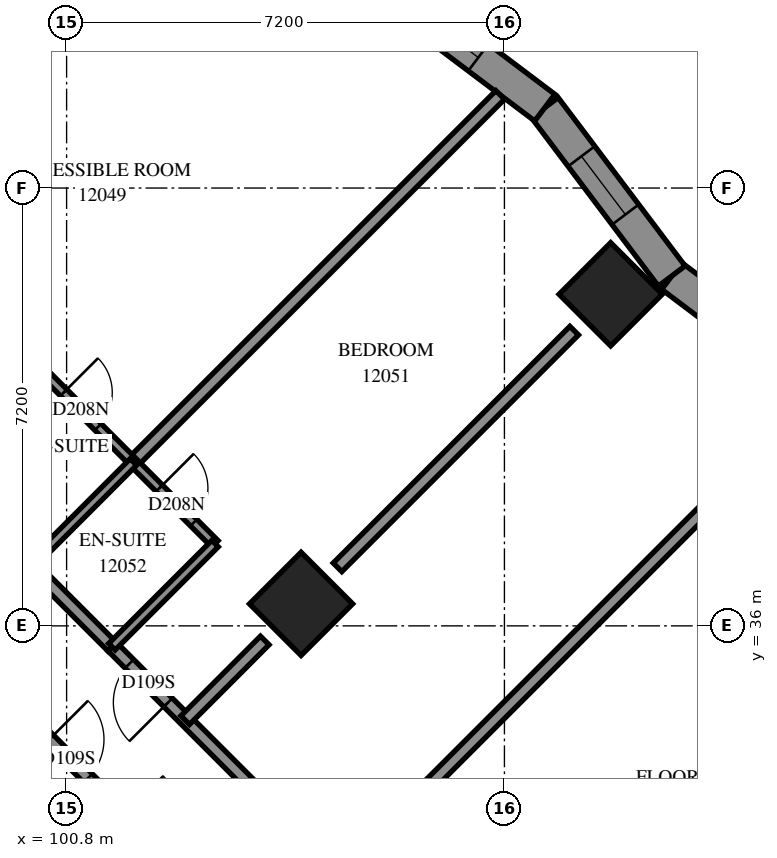
"""IFC4 building model, lengths in metres.
Left out: names, types, materials, properties, quantities, classifications, styles, units other than length and angle.
Written with IfcOpenShell. Run it as: python <this file> out.ifc"""

import sys

from ifc_helpers import new_model, si_unit, direction, frame, frame_2d, origin, origin_2d, place, context, subcontext, project, spatial, polyline, rectangle, outline, extrude, element, fill, save


model = new_model("IFC4")
c1 = context("Model", 3, precision=1e-05, world=origin(), true_north=direction((0.0, 1.0)))
c2 = subcontext(c1, "Body", "Model", "MODEL_VIEW")
j1 = project(units=[si_unit("LENGTHUNIT", "METRE"), si_unit("PLANEANGLEUNIT", "RADIAN")], contexts=[c1])
p1 = place(None, origin())
s1 = spatial("IfcSite", under=j1, at=p1, CompositionType="ELEMENT")
p2 = place(p1, origin())
s2 = spatial("IfcBuilding", under=s1, at=p2, CompositionType="ELEMENT")
p3 = place(p2, frame((0.0, 0.0, 47.4)))
s3 = spatial("IfcBuildingStorey", under=s2, at=p3, CompositionType="ELEMENT", Elevation=47.4)
for number, where, z_axis, x_axis in (
    (1, (109.747, 41.453, 0.0), (0.0, 0.0, 1.0), (0.707, -0.707, 0.0)),
    (2, (104.656, 36.362, 0.0), (0.0, 0.0, 1.0), (0.707, -0.707, 0.0)),
):
    element("IfcColumn", number, at=place(p3, frame(where, z_axis=z_axis, x_axis=x_axis)), inside=s3, PredefinedType="COLUMN", context=c2, shape_type="SweptSolid", body=[
        extrude(rectangle(XDim=1.2, YDim=1.2, at=origin_2d()), origin(), (0.0, 0.0, 1.0), 3.1),
    ])
p4 = place(p3, frame((113.52, 39.666, 0.0), z_axis=(0.0, 0.0, 1.0), x_axis=(-0.7985233882, 0.601963785, 0.0)))
e3 = element("IfcWall", 3, at=p4, inside=s3, PredefinedType="SOLIDWALL", context=c2, shape_type="SweptSolid", body=[
    extrude(outline(polyline([(-0.039, -0.275), (3.429, -0.275), (3.506, 0.275), (0.039, 0.275), (-0.039, -0.275)])), origin(), (0.0, 0.0, 1.0), 3.1),
])
p5 = place(p4, frame((1.153, 0.0, 0.5)))
e4 = element("IfcOpeningElement", 4, at=p5, cuts=e3, PredefinedType="OPENING", context=c2, shape_type="SweptSolid", body=[
    extrude(rectangle(XDim=1.2, YDim=2.45, at=frame_2d((0.6, 1.225))), frame((0.0, 0.285, 0.0), z_axis=(0.0, -1.0, 0.0), x_axis=(1.0, 0.0, 0.0)), (0.0, 0.0, 1.0), 0.57),
])
p6 = place(p3, frame((110.751, 41.753, 0.0), z_axis=(0.0, 0.0, 1.0), x_axis=(-0.6019683111, 0.7985199762, 0.0)))
e5 = element("IfcWall", 5, at=p6, inside=s3, PredefinedType="SOLIDWALL", context=c2, shape_type="SweptSolid", body=[
    extrude(outline(polyline([(0.039, -0.275), (3.506, -0.275), (3.429, 0.275), (-0.039, 0.275), (0.039, -0.275)])), origin(), (0.0, 0.0, 1.0), 3.1),
])
p7 = place(p6, frame((1.266, 0.0, 0.5)))
e6 = element("IfcOpeningElement", 6, at=p7, cuts=e5, PredefinedType="OPENING", context=c2, shape_type="SweptSolid", body=[
    extrude(rectangle(XDim=1.2, YDim=2.45, at=frame_2d((0.6, 1.225))), frame((0.0, 0.285, 0.0), z_axis=(0.0, -1.0, 0.0), x_axis=(1.0, 0.0, 0.0)), (0.0, 0.0, 1.0), 0.57),
])
p8 = place(p3, frame((108.664, 44.522, 0.0), z_axis=(0.0, 0.0, 1.0), x_axis=(-0.7985338376, 0.6019499233, 0.0)))
e7 = element("IfcWall", 7, at=p8, inside=s3, PredefinedType="SOLIDWALL", context=c2, shape_type="SweptSolid", body=[
    extrude(outline(polyline([(-0.039, -0.275), (3.429, -0.275), (3.506, 0.275), (0.039, 0.275), (-0.039, -0.275)])), origin(), (0.0, 0.0, 1.0), 3.1),
])
p9 = place(p8, frame((1.369, 0.0, 0.5)))
e8 = element("IfcOpeningElement", 8, at=p9, cuts=e7, PredefinedType="OPENING", context=c2, shape_type="SweptSolid", body=[
    extrude(rectangle(XDim=1.2, YDim=2.45, at=frame_2d((0.6, 1.225))), frame((0.0, 0.285, 0.0), z_axis=(0.0, -1.0, 0.0), x_axis=(1.0, 0.0, 0.0)), (0.0, 0.0, 1.0), 0.57),
])
p10 = place(p3, frame((93.481, 41.167, 0.0), z_axis=(0.0, 0.0, 1.0), x_axis=(0.7071067812, -0.7071067812, 0.0)))
e9 = element("IfcWall", 9, at=p10, inside=s3, PredefinedType="PARTITIONING", context=c2, shape_type="SweptSolid", body=[
    extrude(rectangle(XDim=25.699, YDim=0.2, at=frame_2d((12.85, 0.0))), origin(), (0.0, 0.0, 1.0), 3.1),
])
p11 = place(p10, frame((2.8, 0.0, 0.0)))
e10 = element("IfcOpeningElement", 10, at=p11, cuts=e9, PredefinedType="OPENING", context=c2, shape_type="SweptSolid", body=[
    extrude(rectangle(XDim=0.9, YDim=2.1, at=frame_2d((0.45, 1.05))), frame((0.0, 0.11, 0.0), z_axis=(0.0, -1.0, 0.0), x_axis=(1.0, 0.0, 0.0)), (0.0, 0.0, 1.0), 0.22),
])
p12 = place(p10, frame((9.948, 0.0, 0.0)))
e11 = element("IfcOpeningElement", 11, at=p12, cuts=e9, PredefinedType="OPENING", context=c2, shape_type="SweptSolid", body=[
    extrude(rectangle(XDim=0.9, YDim=2.1, at=frame_2d((0.45, 1.05))), frame((0.0, 0.11, 0.0), z_axis=(0.0, -1.0, 0.0), x_axis=(1.0, 0.0, 0.0)), (0.0, 0.0, 1.0), 0.22),
])
p13 = place(p10, frame((11.7, 0.0, 0.0)))
e12 = element("IfcOpeningElement", 12, at=p13, cuts=e9, PredefinedType="OPENING", context=c2, shape_type="SweptSolid", body=[
    extrude(rectangle(XDim=0.9, YDim=2.1, at=frame_2d((0.45, 1.05))), frame((0.0, 0.11, 0.0), z_axis=(0.0, -1.0, 0.0), x_axis=(1.0, 0.0, 0.0)), (0.0, 0.0, 1.0), 0.22),
])
p14 = place(p10, frame((17.25, 0.0, 0.0)))
e13 = element("IfcOpeningElement", 13, at=p14, cuts=e9, PredefinedType="OPENING", context=c2, shape_type="SweptSolid", body=[
    extrude(rectangle(XDim=0.9, YDim=2.1, at=frame_2d((0.45, 1.05))), frame((0.0, 0.11, 0.0), z_axis=(0.0, -1.0, 0.0), x_axis=(1.0, 0.0, 0.0)), (0.0, 0.0, 1.0), 0.22),
])
p15 = place(p10, frame((22.82, 0.0, 0.0)))
e14 = element("IfcOpeningElement", 14, at=p15, cuts=e9, PredefinedType="OPENING", context=c2, shape_type="SweptSolid", body=[
    extrude(rectangle(XDim=0.9, YDim=2.1, at=frame_2d((0.45, 1.05))), frame((0.0, 0.11, 0.0), z_axis=(0.0, -1.0, 0.0), x_axis=(1.0, 0.0, 0.0)), (0.0, 0.0, 1.0), 0.22),
])
p16 = place(p3, frame((111.352, 25.855, 0.0), z_axis=(0.0, 0.0, 1.0), x_axis=(-0.7070418597, 0.7071716967, 0.0)))
e15 = element("IfcWall", 15, at=p16, inside=s3, PredefinedType="PARTITIONING", context=c2, shape_type="SweptSolid", body=[
    extrude(rectangle(XDim=13.864, YDim=0.2, at=frame_2d((6.932, 0.0))), origin(), (0.0, 0.0, 1.0), 3.1),
])
p17 = place(p16, frame((12.564, 0.0, 0.0)))
e16 = element("IfcOpeningElement", 16, at=p17, cuts=e15, PredefinedType="OPENING", context=c2, shape_type="SweptSolid", body=[
    extrude(rectangle(XDim=0.9, YDim=2.1, at=frame_2d((0.45, 1.05))), frame((0.0, 0.11, 0.0), z_axis=(0.0, -1.0, 0.0), x_axis=(1.0, 0.0, 0.0)), (0.0, 0.0, 1.0), 0.22),
])
p18 = place(p16, frame((5.19, 0.0, 0.0)))
e17 = element("IfcOpeningElement", 17, at=p18, cuts=e15, PredefinedType="OPENING", context=c2, shape_type="SweptSolid", body=[
    extrude(rectangle(XDim=1.0, YDim=2.1, at=frame_2d((0.5, 1.05))), frame((0.0, 0.11, 0.0), z_axis=(0.0, -1.0, 0.0), x_axis=(1.0, 0.0, 0.0)), (0.0, 0.0, 1.0), 0.22),
])
p19 = place(p3, frame((105.292, 31.908, 0.0), z_axis=(0.0, 0.0, 1.0), x_axis=(0.7071067812, 0.7071067812, 0.0)))
e18 = element("IfcWall", 18, at=p19, inside=s3, PredefinedType="PARTITIONING", context=c2, shape_type="SweptSolid", body=[
    extrude(rectangle(XDim=10.979, YDim=0.2, at=frame_2d((5.49, 0.0))), origin(), (0.0, 0.0, 1.0), 3.1),
])
p20 = place(p3, frame((95.109, 42.091, 0.0), z_axis=(0.0, 0.0, 1.0), x_axis=(0.7071113741, 0.7071021882, 0.0)))
e19 = element("IfcWall", 19, at=p20, inside=s3, PredefinedType="PARTITIONING", context=c2, shape_type="SweptSolid", body=[
    extrude(rectangle(XDim=10.886, YDim=0.2, at=frame_2d((5.443, 0.0))), origin(), (0.0, 0.0, 1.0), 3.1),
])
p21 = place(p3, frame((94.761, 42.446, 0.0), z_axis=(0.0, 0.0, 1.0), x_axis=(0.7071067812, -0.7071067812, 0.0)))
e20 = element("IfcWall", 20, at=p21, inside=s3, PredefinedType="PARTITIONING", context=c2, shape_type="SweptSolid", body=[
    extrude(rectangle(XDim=9.597, YDim=0.2, at=frame_2d((4.798, 0.0))), origin(), (0.0, 0.0, 1.0), 3.1),
])
p22 = place(p21, frame((2.851, 0.0, 0.0)))
e21 = element("IfcOpeningElement", 21, at=p22, cuts=e20, PredefinedType="OPENING", context=c2, shape_type="SweptSolid", body=[
    extrude(rectangle(XDim=0.9, YDim=2.1, at=frame_2d((0.45, 1.05))), frame((0.0, 0.11, 0.0), z_axis=(0.0, -1.0, 0.0), x_axis=(1.0, 0.0, 0.0)), (0.0, 0.0, 1.0), 0.22),
])
p23 = place(p3, frame((94.757, 42.445, 0.0), z_axis=(0.0, 0.0, 1.0), x_axis=(0.7071067812, 0.7071067812, 0.0)))
e22 = element("IfcWall", 22, at=p23, inside=s3, PredefinedType="PARTITIONING", context=c2, shape_type="SweptSolid", body=[
    extrude(rectangle(XDim=9.399, YDim=0.2, at=frame_2d((4.699, 0.0))), origin(), (0.0, 0.0, 1.0), 3.1),
])
p24 = place(p3, frame((101.896, 38.698, 0.0), z_axis=(0.0, 0.0, 1.0), x_axis=(0.7072298261, 0.7069837149, 0.0)))
e23 = element("IfcWall", 23, at=p24, inside=s3, PredefinedType="PARTITIONING", context=c2, shape_type="SweptSolid", body=[
    extrude(rectangle(XDim=8.533, YDim=0.2, at=frame_2d((4.266, 0.0))), origin(), (0.0, 0.0, 1.0), 3.1),
])
p25 = place(p3, frame((105.255, 36.963, 0.0), z_axis=(0.0, 0.0, 1.0), x_axis=(0.7071067812, 0.7071067812, 0.0)))
e24 = element("IfcWall", 24, at=p25, inside=s3, PredefinedType="PARTITIONING", context=c2, shape_type="SweptSolid", body=[
    extrude(rectangle(XDim=5.504, YDim=0.2, at=frame_2d((2.752, 0.0))), origin(), (0.0, 0.0, 1.0), 3.1),
])
p26 = place(p3, frame((100.126, 40.461, 0.0), z_axis=(0.0, 0.0, 1.0), x_axis=(0.7071067812, -0.7071067812, 0.0)))
e25 = element("IfcWall", 25, at=p26, inside=s3, PredefinedType="PARTITIONING", context=c2, shape_type="SweptSolid", body=[
    extrude(rectangle(XDim=4.401, YDim=0.15, at=frame_2d((2.2, 0.0))), origin(), (0.0, 0.0, 1.0), 3.1),
])
p27 = place(p26, frame((0.883, 0.0, 0.0)))
e26 = element("IfcOpeningElement", 26, at=p27, cuts=e25, PredefinedType="OPENING", context=c2, shape_type="SweptSolid", body=[
    extrude(rectangle(XDim=0.8, YDim=2.1, at=frame_2d((0.4, 1.05))), frame((0.0, 0.085, 0.0), z_axis=(0.0, -1.0, 0.0), x_axis=(1.0, 0.0, 0.0)), (0.0, 0.0, 1.0), 0.17),
])
p28 = place(p26, frame((3.108, 0.0, 0.0)))
e27 = element("IfcOpeningElement", 27, at=p28, cuts=e25, PredefinedType="OPENING", context=c2, shape_type="SweptSolid", body=[
    extrude(rectangle(XDim=0.8, YDim=2.1, at=frame_2d((0.4, 1.05))), frame((0.0, 0.085, 0.0), z_axis=(0.0, -1.0, 0.0), x_axis=(1.0, 0.0, 0.0)), (0.0, 0.0, 1.0), 0.17),
])
p29 = place(p3, frame((100.203, 36.997, 0.0), z_axis=(0.0, 0.0, 1.0), x_axis=(0.706689978, 0.7075233388, 0.0)))
e28 = element("IfcWall", 28, at=p29, inside=s3, PredefinedType="PARTITIONING", context=c2, shape_type="SweptSolid", body=[
    extrude(rectangle(XDim=2.4, YDim=0.15, at=frame_2d((1.2, 0.0))), origin(), (0.0, 0.0, 1.0), 3.1),
])
p30 = place(p3, frame((101.545, 35.657, 0.0), z_axis=(0.0, 0.0, 1.0), x_axis=(0.7071067812, 0.7071067812, 0.0)))
e29 = element("IfcWall", 29, at=p30, inside=s3, PredefinedType="PARTITIONING", context=c2, shape_type="SweptSolid", body=[
    extrude(rectangle(XDim=2.398, YDim=0.15, at=frame_2d((1.199, 0.0))), origin(), (0.0, 0.0, 1.0), 3.1),
])
p31 = place(p3, frame((102.75, 34.45, 0.0), z_axis=(0.0, 0.0, 1.0), x_axis=(0.7065663865, 0.7076467632, 0.0)))
e30 = element("IfcWall", 30, at=p31, inside=s3, PredefinedType="PARTITIONING", context=c2, shape_type="SweptSolid", body=[
    extrude(rectangle(XDim=1.851, YDim=0.2, at=frame_2d((0.926, 0.0))), origin(), (0.0, 0.0, 1.0), 3.1),
])
p32 = place(p7, origin())
e31 = element("IfcWindow", 31, at=p32, inside=s3, PartitioningType="SINGLE_PANEL", PredefinedType="WINDOW", context=c2, shape_type="SweptSolid", body=[
    extrude(rectangle(XDim=1.2, YDim=2.45, at=frame_2d((0.6, 1.225))), frame((0.0, 0.155, 0.0), z_axis=(0.0, -1.0, 0.0), x_axis=(1.0, 0.0, 0.0)), (0.0, 0.0, 1.0), 0.06),
])
fill(e6, e31)
p33 = place(p9, origin())
e32 = element("IfcWindow", 32, at=p33, inside=s3, PartitioningType="SINGLE_PANEL", PredefinedType="WINDOW", context=c2, shape_type="SweptSolid", body=[
    extrude(rectangle(XDim=1.2, YDim=2.45, at=frame_2d((0.6, 1.225))), frame((0.0, 0.155, 0.0), z_axis=(0.0, -1.0, 0.0), x_axis=(1.0, 0.0, 0.0)), (0.0, 0.0, 1.0), 0.06),
])
fill(e8, e32)
p34 = place(p27, origin())
e33 = element("IfcDoor", 33, at=p34, inside=s3, OperationType="SINGLE_SWING_RIGHT", PredefinedType="DOOR", context=c2, shape_type="SweptSolid", body=[
    extrude(rectangle(XDim=0.8, YDim=2.1, at=frame_2d((0.4, 1.05))), frame((0.0, 0.025, 0.0), z_axis=(0.0, -1.0, 0.0), x_axis=(1.0, 0.0, 0.0)), (0.0, 0.0, 1.0), 0.05),
])
fill(e26, e33)
p35 = place(p17, origin())
e34 = element("IfcDoor", 34, at=p35, inside=s3, OperationType="SINGLE_SWING_RIGHT", PredefinedType="DOOR", context=c2, shape_type="SweptSolid", body=[
    extrude(rectangle(XDim=0.9, YDim=2.1, at=frame_2d((0.45, 1.05))), frame((0.0, 0.025, 0.0), z_axis=(0.0, -1.0, 0.0), x_axis=(1.0, 0.0, 0.0)), (0.0, 0.0, 1.0), 0.05),
])
fill(e16, e34)
p36 = place(p28, origin())
e35 = element("IfcDoor", 35, at=p36, inside=s3, OperationType="SINGLE_SWING_RIGHT", PredefinedType="DOOR", context=c2, shape_type="SweptSolid", body=[
    extrude(rectangle(XDim=0.8, YDim=2.1, at=frame_2d((0.4, 1.05))), frame((0.0, 0.025, 0.0), z_axis=(0.0, -1.0, 0.0), x_axis=(1.0, 0.0, 0.0)), (0.0, 0.0, 1.0), 0.05),
])
fill(e27, e35)
p37 = place(p12, origin())
e36 = element("IfcDoor", 36, at=p37, inside=s3, OperationType="SINGLE_SWING_LEFT", PredefinedType="DOOR", context=c2, shape_type="SweptSolid", body=[
    extrude(rectangle(XDim=0.9, YDim=2.1, at=frame_2d((0.45, 1.05))), frame((0.0, 0.025, 0.0), z_axis=(0.0, -1.0, 0.0), x_axis=(1.0, 0.0, 0.0)), (0.0, 0.0, 1.0), 0.05),
])
fill(e11, e36)
save(model, sys.argv[1])
